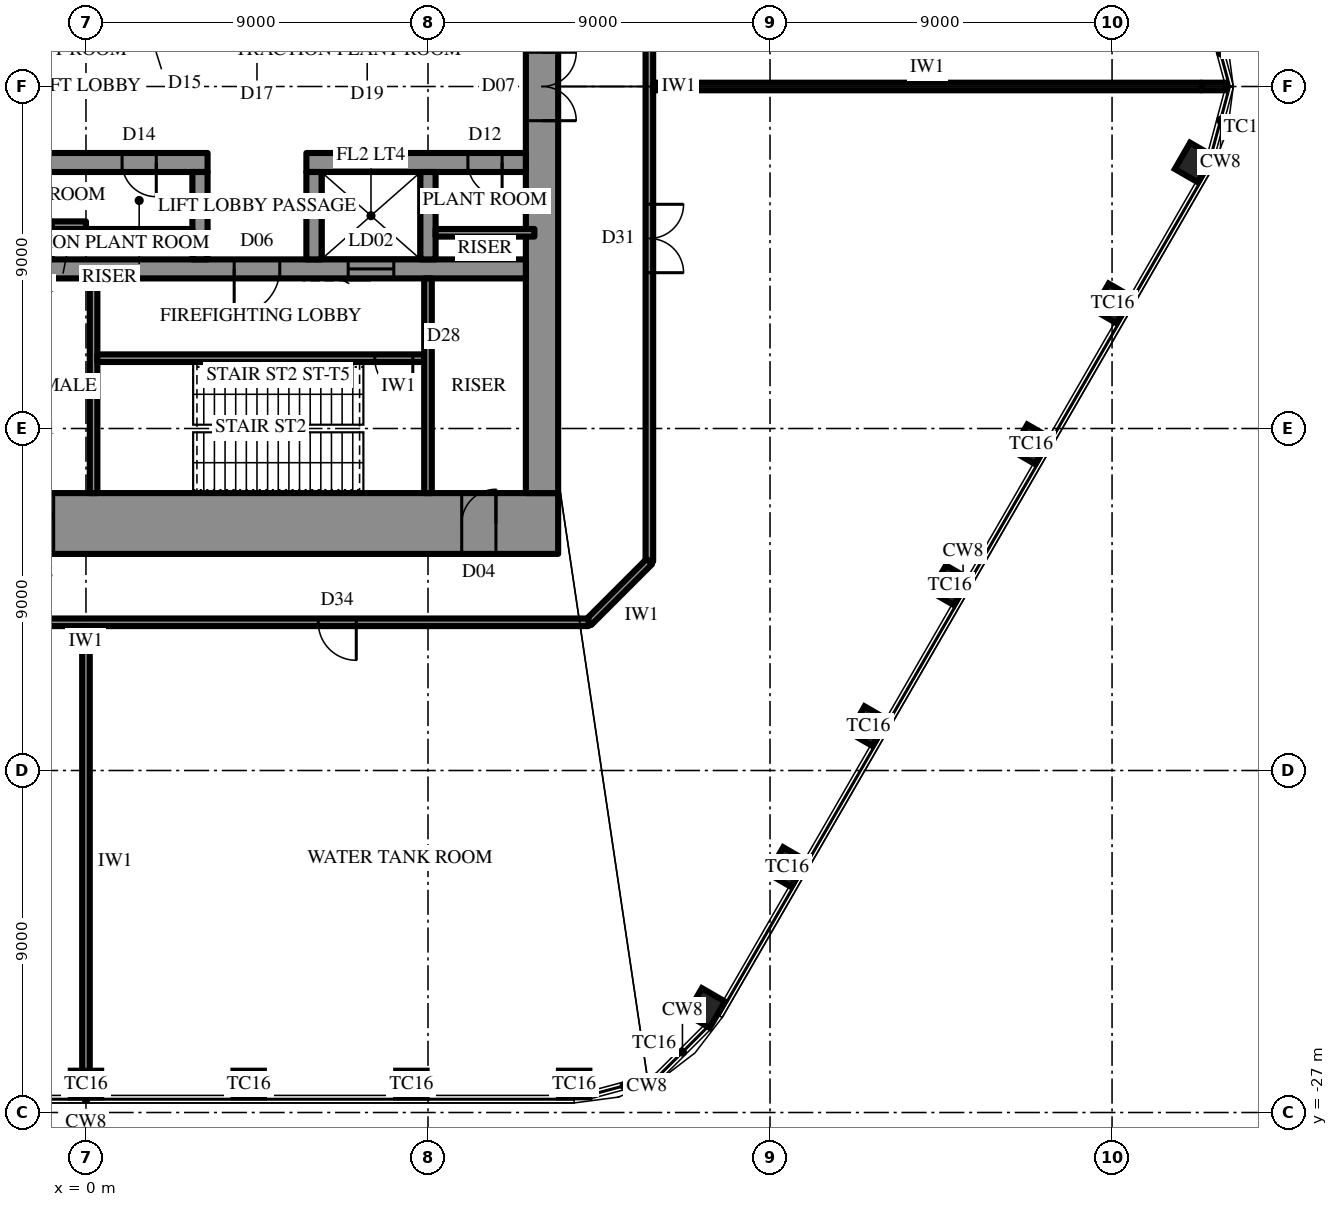
"""IFC4 building model, lengths in metres.
Left out: names, types, materials, properties, quantities, classifications, styles, units other than length and angle.
Written with IfcOpenShell. Run it as: python <this file> out.ifc"""

import sys

from ifc_helpers import new_model, si_unit, direction, frame, frame_2d, origin, origin_2d, place, context, subcontext, project, spatial, rectangle, extrude, element, fill, save


model = new_model("IFC4")
c1 = context("Model", 3, precision=1e-05, world=origin(), true_north=direction((0.0, 1.0)))
c2 = subcontext(c1, "Body", "Model", "MODEL_VIEW")
j1 = project(units=[si_unit("LENGTHUNIT", "METRE"), si_unit("PLANEANGLEUNIT", "RADIAN")], contexts=[c1])
p1 = place(None, origin())
s1 = spatial("IfcSite", under=j1, at=p1, CompositionType="ELEMENT")
p2 = place(p1, origin())
s2 = spatial("IfcBuilding", under=s1, at=p2, CompositionType="ELEMENT")
p3 = place(p2, frame((0.0, 0.0, 396.3)))
s3 = spatial("IfcBuildingStorey", under=s2, at=p3, CompositionType="ELEMENT", Elevation=396.3)
for number, where, z_axis, x_axis in (
    (1, (0.0, -26.25, 0.0), (0.0, 0.0, 1.0), (1.0, 0.0, 0.0)),
    (2, (4.282, -26.25, 0.0), (0.0, 0.0, 1.0), (1.0, 0.0, 0.0)),
    (3, (8.564, -26.25, 0.0), (0.0, 0.0, 1.0), (1.0, 0.0, 0.0)),
    (4, (12.846, -26.25, 0.0), (0.0, 0.0, 1.0), (1.0, 0.0, 0.0)),
    (5, (16.31, -24.25, 0.0), (0.0, 0.0, 1.0), (0.5, 0.866, 0.0)),
    (6, (18.451, -20.542, 0.0), (0.0, 0.0, 1.0), (0.5, 0.866, 0.0)),
    (7, (20.592, -16.833, 0.0), (0.0, 0.0, 1.0), (0.5, 0.866, 0.0)),
    (8, (22.733, -13.125, 0.0), (0.0, 0.0, 1.0), (0.5, 0.866, 0.0)),
    (9, (24.874, -9.417, 0.0), (0.0, 0.0, 1.0), (0.5, 0.866, 0.0)),
    (10, (27.015, -5.708, 0.0), (0.0, 0.0, 1.0), (0.5, 0.866, 0.0)),
    (11, (29.156, -2.0, 0.0), (0.0, 0.0, 1.0), (0.5, 0.866, 0.0)),
):
    element("IfcColumn", number, at=place(p3, frame(where, z_axis=z_axis, x_axis=x_axis)), inside=s3, PredefinedType="COLUMN", context=c2, shape_type="SweptSolid", body=[
        extrude(rectangle(XDim=0.8, YDim=0.7, at=origin_2d()), origin(), (0.0, 0.0, 1.0), 6.0),
    ])
p4 = place(p3, frame((12.425, -11.5, 0.0), z_axis=(0.0, 0.0, 1.0), x_axis=(-1.0, 0.0, 0.0)))
e12 = element("IfcWall", 12, at=p4, inside=s3, PredefinedType="SHEAR", context=c2, shape_type="SweptSolid", body=[
    extrude(rectangle(XDim=24.85, YDim=1.6, at=frame_2d((12.425, 0.0))), origin(), (0.0, 0.0, 1.0), 6.0),
])
p5 = place(p4, frame((13.275, 0.0, 0.0)))
e13 = element("IfcOpeningElement", 13, at=p5, cuts=e12, PredefinedType="OPENING", context=c2, shape_type="SweptSolid", body=[
    extrude(rectangle(XDim=0.9, YDim=2.2, at=frame_2d((0.45, 1.1))), frame((0.0, 0.81, 0.0), z_axis=(0.0, -1.0, 0.0), x_axis=(1.0, 0.0, 0.0)), (0.0, 0.0, 1.0), 1.62),
])
p6 = place(p4, frame((16.275, 0.0, 0.0)))
e14 = element("IfcOpeningElement", 14, at=p6, cuts=e12, PredefinedType="OPENING", context=c2, shape_type="SweptSolid", body=[
    extrude(rectangle(XDim=0.9, YDim=2.2, at=frame_2d((0.45, 1.1))), frame((0.0, 0.81, 0.0), z_axis=(0.0, -1.0, 0.0), x_axis=(1.0, 0.0, 0.0)), (0.0, 0.0, 1.0), 1.62),
])
p7 = place(p4, frame((19.325, 0.0, 0.0)))
e15 = element("IfcOpeningElement", 15, at=p7, cuts=e12, PredefinedType="OPENING", context=c2, shape_type="SweptSolid", body=[
    extrude(rectangle(XDim=1.0, YDim=2.2, at=frame_2d((0.5, 1.1))), frame((0.0, 0.81, 0.0), z_axis=(0.0, -1.0, 0.0), x_axis=(1.0, 0.0, 0.0)), (0.0, 0.0, 1.0), 1.62),
])
p8 = place(p4, frame((1.637, 0.0, 0.0)))
e16 = element("IfcOpeningElement", 16, at=p8, cuts=e12, PredefinedType="OPENING", context=c2, shape_type="SweptSolid", body=[
    extrude(rectangle(XDim=0.9, YDim=2.2, at=frame_2d((0.45, 1.1))), frame((0.0, 0.81, 0.0), z_axis=(0.0, -1.0, 0.0), x_axis=(1.0, 0.0, 0.0)), (0.0, 0.0, 1.0), 1.62),
])
p9 = place(p4, frame((22.312, 0.0, 0.0)))
e17 = element("IfcOpeningElement", 17, at=p9, cuts=e12, PredefinedType="OPENING", context=c2, shape_type="SweptSolid", body=[
    extrude(rectangle(XDim=0.9, YDim=2.2, at=frame_2d((0.45, 1.1))), frame((0.0, 0.81, 0.0), z_axis=(0.0, -1.0, 0.0), x_axis=(1.0, 0.0, 0.0)), (0.0, 0.0, 1.0), 1.62),
])
p10 = place(p3, frame((12.0, -10.7, 0.0), z_axis=(0.0, 0.0, 1.0), x_axis=(0.0, 1.0, 0.0)))
e18 = element("IfcWall", 18, at=p10, inside=s3, PredefinedType="SHEAR", context=c2, shape_type="SweptSolid", body=[
    extrude(rectangle(XDim=21.4, YDim=0.85, at=frame_2d((10.7, 0.0))), origin(), (0.0, 0.0, 1.0), 6.0),
])
p11 = place(p10, frame((9.8, 0.0, 0.0)))
e19 = element("IfcOpeningElement", 19, at=p11, cuts=e18, PredefinedType="OPENING", context=c2, shape_type="SweptSolid", body=[
    extrude(rectangle(XDim=1.8, YDim=2.4, at=frame_2d((0.9, 1.2))), frame((0.0, 0.435, 0.0), z_axis=(0.0, -1.0, 0.0), x_axis=(1.0, 0.0, 0.0)), (0.0, 0.0, 1.0), 0.87),
])
p12 = place(p3, frame((11.575, -2.0, 0.0), z_axis=(0.0, 0.0, 1.0), x_axis=(-1.0, 0.0, 0.0)))
e20 = element("IfcWall", 20, at=p12, inside=s3, PredefinedType="SHEAR", context=c2, shape_type="SweptSolid", body=[
    extrude(rectangle(XDim=5.775, YDim=0.5, at=frame_2d((2.887, 0.0))), origin(), (0.0, 0.0, 1.0), 6.0),
])
p13 = place(p12, frame((0.625, 0.0, 0.0)))
e21 = element("IfcOpeningElement", 21, at=p13, cuts=e20, PredefinedType="OPENING", context=c2, shape_type="SweptSolid", body=[
    extrude(rectangle(XDim=0.9, YDim=2.2, at=frame_2d((0.45, 1.1))), frame((0.0, 0.26, 0.0), z_axis=(0.0, -1.0, 0.0), x_axis=(1.0, 0.0, 0.0)), (0.0, 0.0, 1.0), 0.52),
])
p14 = place(p3, frame((3.2, -2.0, 0.0), z_axis=(0.0, 0.0, 1.0), x_axis=(-1.0, 0.0, 0.0)))
e22 = element("IfcWall", 22, at=p14, inside=s3, PredefinedType="SHEAR", context=c2, shape_type="SweptSolid", body=[
    extrude(rectangle(XDim=14.775, YDim=0.5, at=frame_2d((7.387, 0.0))), origin(), (0.0, 0.0, 1.0), 6.0),
])
p15 = place(p14, frame((1.35, 0.0, 0.0)))
e23 = element("IfcOpeningElement", 23, at=p15, cuts=e22, PredefinedType="OPENING", context=c2, shape_type="SweptSolid", body=[
    extrude(rectangle(XDim=0.9, YDim=2.2, at=frame_2d((0.45, 1.1))), frame((0.0, 0.26, 0.0), z_axis=(0.0, -1.0, 0.0), x_axis=(1.0, 0.0, 0.0)), (0.0, 0.0, 1.0), 0.52),
])
p16 = place(p14, frame((4.25, 0.0, 0.0)))
e24 = element("IfcOpeningElement", 24, at=p16, cuts=e22, PredefinedType="OPENING", context=c2, shape_type="SweptSolid", body=[
    extrude(rectangle(XDim=0.9, YDim=2.2, at=frame_2d((0.45, 1.1))), frame((0.0, 0.26, 0.0), z_axis=(0.0, -1.0, 0.0), x_axis=(1.0, 0.0, 0.0)), (0.0, 0.0, 1.0), 0.52),
])
p17 = place(p14, frame((7.25, 0.0, 0.0)))
e25 = element("IfcOpeningElement", 25, at=p17, cuts=e22, PredefinedType="OPENING", context=c2, shape_type="SweptSolid", body=[
    extrude(rectangle(XDim=0.9, YDim=2.2, at=frame_2d((0.45, 1.1))), frame((0.0, 0.26, 0.0), z_axis=(0.0, -1.0, 0.0), x_axis=(1.0, 0.0, 0.0)), (0.0, 0.0, 1.0), 0.52),
])
p18 = place(p14, frame((10.15, 0.0, 0.0)))
e26 = element("IfcOpeningElement", 26, at=p18, cuts=e22, PredefinedType="OPENING", context=c2, shape_type="SweptSolid", body=[
    extrude(rectangle(XDim=0.9, YDim=2.2, at=frame_2d((0.45, 1.1))), frame((0.0, 0.26, 0.0), z_axis=(0.0, -1.0, 0.0), x_axis=(1.0, 0.0, 0.0)), (0.0, 0.0, 1.0), 0.52),
])
p19 = place(p14, frame((13.25, 0.0, 0.0)))
e27 = element("IfcOpeningElement", 27, at=p19, cuts=e22, PredefinedType="OPENING", context=c2, shape_type="SweptSolid", body=[
    extrude(rectangle(XDim=0.9, YDim=2.2, at=frame_2d((0.45, 1.1))), frame((0.0, 0.26, 0.0), z_axis=(0.0, -1.0, 0.0), x_axis=(1.0, 0.0, 0.0)), (0.0, 0.0, 1.0), 0.52),
])
p20 = place(p3, frame((11.575, -4.8, 0.0), z_axis=(0.0, 0.0, 1.0), x_axis=(-1.0, 0.0, 0.0)))
e28 = element("IfcWall", 28, at=p20, inside=s3, PredefinedType="SHEAR", context=c2, shape_type="SweptSolid", body=[
    extrude(rectangle(XDim=23.15, YDim=0.5, at=frame_2d((11.575, 0.0))), origin(), (0.0, 0.0, 1.0), 6.0),
])
p21 = place(p20, frame((6.475, 0.0, 0.0)))
e29 = element("IfcOpeningElement", 29, at=p21, cuts=e28, PredefinedType="OPENING", context=c2, shape_type="SweptSolid", body=[
    extrude(rectangle(XDim=1.2, YDim=2.2, at=frame_2d((0.6, 1.1))), frame((0.0, 0.26, 0.0), z_axis=(0.0, -1.0, 0.0), x_axis=(1.0, 0.0, 0.0)), (0.0, 0.0, 1.0), 0.52),
])
p22 = place(p20, frame((3.475, 0.0, 0.0)))
e30 = element("IfcOpeningElement", 30, at=p22, cuts=e28, PredefinedType="OPENING", context=c2, shape_type="SweptSolid", body=[
    extrude(rectangle(XDim=1.2, YDim=2.2, at=frame_2d((0.6, 1.1))), frame((0.0, 0.26, 0.0), z_axis=(0.0, -1.0, 0.0), x_axis=(1.0, 0.0, 0.0)), (0.0, 0.0, 1.0), 0.52),
])
for number, where, z_axis, x_axis in (
    (31, (9.0, -2.25, 0.0), (0.0, 0.0, 1.0), (0.0, -1.0, 0.0)),
    (32, (6.0, -2.25, 0.0), (0.0, 0.0, 1.0), (0.0, -1.0, 0.0)),
    (33, (3.0, -2.25, 0.0), (0.0, 0.0, 1.0), (0.0, -1.0, 0.0)),
):
    element("IfcWall", number, at=place(p3, frame(where, z_axis=z_axis, x_axis=x_axis)), inside=s3, PredefinedType="SHEAR", context=c2, shape_type="SweptSolid", body=[
        extrude(rectangle(XDim=2.3, YDim=0.4, at=frame_2d((1.15, 0.0))), origin(), (0.0, 0.0, 1.0), 6.0),
    ])
p23 = place(p3, frame((0.2, -5.05, 0.0), z_axis=(0.0, 0.0, 1.0), x_axis=(0.0, -1.0, 0.0)))
e34 = element("IfcWall", 34, at=p23, inside=s3, PredefinedType="SHEAR", context=c2, shape_type="SweptSolid", body=[
    extrude(rectangle(XDim=5.65, YDim=0.2, at=frame_2d((2.825, 0.0))), origin(), (0.0, 0.0, 1.0), 6.0),
])
p24 = place(p3, frame((8.9, -7.15, 0.0), z_axis=(0.0, 0.0, 1.0), x_axis=(-1.0, 0.0, 0.0)))
e35 = element("IfcWall", 35, at=p24, inside=s3, PredefinedType="SHEAR", context=c2, shape_type="SweptSolid", body=[
    extrude(rectangle(XDim=8.6, YDim=0.2, at=frame_2d((4.3, 0.0))), origin(), (0.0, 0.0, 1.0), 6.0),
])
p25 = place(p24, frame((0.3, 0.0, 0.0)))
e36 = element("IfcOpeningElement", 36, at=p25, cuts=e35, PredefinedType="OPENING", context=c2, shape_type="SweptSolid", body=[
    extrude(rectangle(XDim=1.0, YDim=2.2, at=frame_2d((0.5, 1.1))), frame((0.0, 0.11, 0.0), z_axis=(0.0, -1.0, 0.0), x_axis=(1.0, 0.0, 0.0)), (0.0, 0.0, 1.0), 0.22),
])
p26 = place(p3, frame((9.0, -5.05, 0.0), z_axis=(0.0, 0.0, 1.0), x_axis=(0.0, -1.0, 0.0)))
e37 = element("IfcWall", 37, at=p26, inside=s3, PredefinedType="PARTITIONING", context=c2, shape_type="SweptSolid", body=[
    extrude(rectangle(XDim=5.65, YDim=0.2, at=frame_2d((2.825, 0.0))), origin(), (0.0, 0.0, 1.0), 5.8),
])
p27 = place(p3, frame((11.8, -3.85, 0.0), z_axis=(0.0, 0.0, 1.0), x_axis=(-1.0, 0.0, 0.0)))
e38 = element("IfcWall", 38, at=p27, inside=s3, PredefinedType="PARTITIONING", context=c2, shape_type="SweptSolid", body=[
    extrude(rectangle(XDim=2.6, YDim=0.2, at=frame_2d((1.3, 0.0))), origin(), (0.0, 0.0, 1.0), 5.8),
])
p28 = place(p3, frame((2.8, -3.85, 0.0), z_axis=(0.0, 0.0, 1.0), x_axis=(-1.0, 0.0, 0.0)))
e39 = element("IfcWall", 39, at=p28, inside=s3, PredefinedType="PARTITIONING", context=c2, shape_type="SweptSolid", body=[
    extrude(rectangle(XDim=2.8, YDim=0.2, at=frame_2d((1.4, 0.0))), origin(), (0.0, 0.0, 1.0), 5.8),
])
p29 = place(p3, frame((0.0, -3.65, 0.0), z_axis=(0.0, 0.0, 1.0), x_axis=(-1.0, 0.0, 0.0)))
e40 = element("IfcWall", 40, at=p29, inside=s3, PredefinedType="PARTITIONING", context=c2, shape_type="SweptSolid", body=[
    extrude(rectangle(XDim=1.0, YDim=0.2, at=frame_2d((0.5, 0.0))), origin(), (0.0, 0.0, 1.0), 5.8),
])
p30 = place(p3, frame((14.825, 12.5, 0.0), z_axis=(0.0, 0.0, 1.0), x_axis=(0.0, -1.0, 0.0)))
e41 = element("IfcWall", 41, at=p30, inside=s3, PredefinedType="PARTITIONING", context=c2, shape_type="SweptSolid", body=[
    extrude(rectangle(XDim=25.0, YDim=0.2, at=frame_2d((12.5, 0.0))), origin(), (0.0, 0.0, 1.0), 5.8),
])
p31 = place(p30, frame((7.6, 0.0, 0.0)))
e42 = element("IfcOpeningElement", 42, at=p31, cuts=e41, PredefinedType="OPENING", context=c2, shape_type="SweptSolid", body=[
    extrude(rectangle(XDim=1.8, YDim=2.4, at=frame_2d((0.9, 1.2))), frame((0.0, 0.11, 0.0), z_axis=(0.0, -1.0, 0.0), x_axis=(1.0, 0.0, 0.0)), (0.0, 0.0, 1.0), 0.22),
])
p32 = place(p30, frame((15.6, 0.0, 0.0)))
e43 = element("IfcOpeningElement", 43, at=p32, cuts=e41, PredefinedType="OPENING", context=c2, shape_type="SweptSolid", body=[
    extrude(rectangle(XDim=1.8, YDim=2.4, at=frame_2d((0.9, 1.2))), frame((0.0, 0.11, 0.0), z_axis=(0.0, -1.0, 0.0), x_axis=(1.0, 0.0, 0.0)), (0.0, 0.0, 1.0), 0.22),
])
p33 = place(p3, frame((14.825, -12.5, 0.0), z_axis=(0.0, 0.0, 1.0), x_axis=(-0.707052830339, -0.707160727918, 0.0)))
e44 = element("IfcWall", 44, at=p33, inside=s3, PredefinedType="PARTITIONING", context=c2, shape_type="SweptSolid", body=[
    extrude(rectangle(XDim=2.263, YDim=0.2, at=frame_2d((1.131, 0.0))), origin(), (0.0, 0.0, 1.0), 5.8),
])
p34 = place(p3, frame((13.225, -14.1, 0.0), z_axis=(0.0, 0.0, 1.0), x_axis=(-1.0, 0.0, 0.0)))
e45 = element("IfcWall", 45, at=p34, inside=s3, PredefinedType="PARTITIONING", context=c2, shape_type="SweptSolid", body=[
    extrude(rectangle(XDim=26.45, YDim=0.2, at=frame_2d((13.225, 0.0))), origin(), (0.0, 0.0, 1.0), 5.8),
])
p35 = place(p34, frame((6.113, 0.0, 0.0)))
e46 = element("IfcOpeningElement", 46, at=p35, cuts=e45, PredefinedType="OPENING", context=c2, shape_type="SweptSolid", body=[
    extrude(rectangle(XDim=1.0, YDim=2.2, at=frame_2d((0.5, 1.1))), frame((0.0, 0.11, 0.0), z_axis=(0.0, -1.0, 0.0), x_axis=(1.0, 0.0, 0.0)), (0.0, 0.0, 1.0), 0.22),
])
p36 = place(p3, frame((0.0, -14.2, 0.0), z_axis=(0.0, 0.0, 1.0), x_axis=(0.0, -1.0, 0.0)))
e47 = element("IfcWall", 47, at=p36, inside=s3, PredefinedType="PARTITIONING", context=c2, shape_type="SweptSolid", body=[
    extrude(rectangle(XDim=12.36, YDim=0.2, at=frame_2d((6.18, 0.0))), origin(), (0.0, 0.0, 1.0), 4.792),
])
p37 = place(p3, frame((14.925, 0.0, 0.0), z_axis=(0.0, 0.0, 1.0), x_axis=(1.0, 0.0, 0.0)))
e48 = element("IfcWall", 48, at=p37, inside=s3, PredefinedType="PARTITIONING", context=c2, shape_type="SweptSolid", body=[
    extrude(rectangle(XDim=14.422, YDim=0.2, at=frame_2d((7.211, 0.0))), origin(), (0.0, 0.0, 1.0), 4.744),
])
p38 = place(p3, frame((29.347, 0.0, 0.0), z_axis=(0.0, 0.0, 1.0), x_axis=(1.0, 0.0, 0.0)))
e49 = element("IfcWall", 49, at=p38, inside=s3, PredefinedType="PARTITIONING", context=c2, shape_type="SweptSolid", body=[
    extrude(rectangle(XDim=0.657, YDim=0.2, at=frame_2d((0.328, 0.0))), origin(), (0.0, 0.0, 1.0), 5.8),
])
p39 = place(p11, frame((1.8, 0.0, 0.0), z_axis=(0.0, 0.0, 1.0), x_axis=(-1.0, 0.0, 0.0)))
e50 = element("IfcDoor", 50, at=p39, inside=s3, OperationType="DOUBLE_DOOR_SINGLE_SWING", PredefinedType="DOOR", context=c2, shape_type="SweptSolid", body=[
    extrude(rectangle(XDim=1.8, YDim=2.4, at=frame_2d((0.9, 1.2))), frame((0.0, 0.025, 0.0), z_axis=(0.0, -1.0, 0.0), x_axis=(1.0, 0.0, 0.0)), (0.0, 0.0, 1.0), 0.05),
])
fill(e19, e50)
p40 = place(p21, origin())
e51 = element("IfcDoor", 51, at=p40, inside=s3, OperationType="SINGLE_SWING_LEFT", PredefinedType="DOOR", context=c2, shape_type="SweptSolid", body=[
    extrude(rectangle(XDim=1.2, YDim=2.2, at=frame_2d((0.6, 1.1))), frame((0.0, 0.025, 0.0), z_axis=(0.0, -1.0, 0.0), x_axis=(1.0, 0.0, 0.0)), (0.0, 0.0, 1.0), 0.05),
])
fill(e29, e51)
p41 = place(p25, origin())
e52 = element("IfcDoor", 52, at=p41, inside=s3, OperationType="SINGLE_SWING_RIGHT", PredefinedType="DOOR", context=c2, shape_type="SweptSolid", body=[
    extrude(rectangle(XDim=1.0, YDim=2.2, at=frame_2d((0.5, 1.1))), frame((0.0, 0.025, 0.0), z_axis=(0.0, -1.0, 0.0), x_axis=(1.0, 0.0, 0.0)), (0.0, 0.0, 1.0), 0.05),
])
fill(e36, e52)
p42 = place(p5, frame((0.9, 0.0, 0.0), z_axis=(0.0, 0.0, 1.0), x_axis=(-1.0, 0.0, 0.0)))
e53 = element("IfcDoor", 53, at=p42, inside=s3, OperationType="SINGLE_SWING_RIGHT", PredefinedType="DOOR", context=c2, shape_type="SweptSolid", body=[
    extrude(rectangle(XDim=0.9, YDim=2.2, at=frame_2d((0.45, 1.1))), frame((0.0, 0.025, 0.0), z_axis=(0.0, -1.0, 0.0), x_axis=(1.0, 0.0, 0.0)), (0.0, 0.0, 1.0), 0.05),
])
fill(e13, e53)
p43 = place(p8, frame((0.9, 0.0, 0.0), z_axis=(0.0, 0.0, 1.0), x_axis=(-1.0, 0.0, 0.0)))
e54 = element("IfcDoor", 54, at=p43, inside=s3, OperationType="SINGLE_SWING_LEFT", PredefinedType="DOOR", context=c2, shape_type="SweptSolid", body=[
    extrude(rectangle(XDim=0.9, YDim=2.2, at=frame_2d((0.45, 1.1))), frame((0.0, 0.025, 0.0), z_axis=(0.0, -1.0, 0.0), x_axis=(1.0, 0.0, 0.0)), (0.0, 0.0, 1.0), 0.05),
])
fill(e16, e54)
p44 = place(p13, origin())
e55 = element("IfcDoor", 55, at=p44, inside=s3, OperationType="SINGLE_SWING_RIGHT", PredefinedType="DOOR", context=c2, shape_type="SweptSolid", body=[
    extrude(rectangle(XDim=0.9, YDim=2.2, at=frame_2d((0.45, 1.1))), frame((0.0, 0.025, 0.0), z_axis=(0.0, -1.0, 0.0), x_axis=(1.0, 0.0, 0.0)), (0.0, 0.0, 1.0), 0.05),
])
fill(e21, e55)
p45 = place(p15, origin())
e56 = element("IfcDoor", 56, at=p45, inside=s3, OperationType="SINGLE_SWING_RIGHT", PredefinedType="DOOR", context=c2, shape_type="SweptSolid", body=[
    extrude(rectangle(XDim=0.9, YDim=2.2, at=frame_2d((0.45, 1.1))), frame((0.0, 0.025, 0.0), z_axis=(0.0, -1.0, 0.0), x_axis=(1.0, 0.0, 0.0)), (0.0, 0.0, 1.0), 0.05),
])
fill(e23, e56)
p46 = place(p22, origin())
e57 = element("IfcDoor", 57, at=p46, inside=s3, OperationType="SLIDING_TO_LEFT", PredefinedType="DOOR", context=c2, shape_type="SweptSolid", body=[
    extrude(rectangle(XDim=1.2, YDim=2.2, at=frame_2d((0.6, 1.1))), frame((0.0, 0.025, 0.0), z_axis=(0.0, -1.0, 0.0), x_axis=(1.0, 0.0, 0.0)), (0.0, 0.0, 1.0), 0.05),
])
fill(e30, e57)
p47 = place(p35, origin())
e58 = element("IfcDoor", 58, at=p47, inside=s3, OperationType="SINGLE_SWING_RIGHT", PredefinedType="DOOR", context=c2, shape_type="SweptSolid", body=[
    extrude(rectangle(XDim=1.0, YDim=2.2, at=frame_2d((0.5, 1.1))), frame((0.0, 0.025, 0.0), z_axis=(0.0, -1.0, 0.0), x_axis=(1.0, 0.0, 0.0)), (0.0, 0.0, 1.0), 0.05),
])
fill(e46, e58)
p48 = place(p32, origin())
e59 = element("IfcDoor", 59, at=p48, inside=s3, OperationType="DOUBLE_DOOR_SINGLE_SWING", PredefinedType="DOOR", context=c2, shape_type="SweptSolid", body=[
    extrude(rectangle(XDim=1.8, YDim=2.4, at=frame_2d((0.9, 1.2))), frame((0.0, 0.025, 0.0), z_axis=(0.0, -1.0, 0.0), x_axis=(1.0, 0.0, 0.0)), (0.0, 0.0, 1.0), 0.05),
])
fill(e43, e59)
save(model, sys.argv[1])
